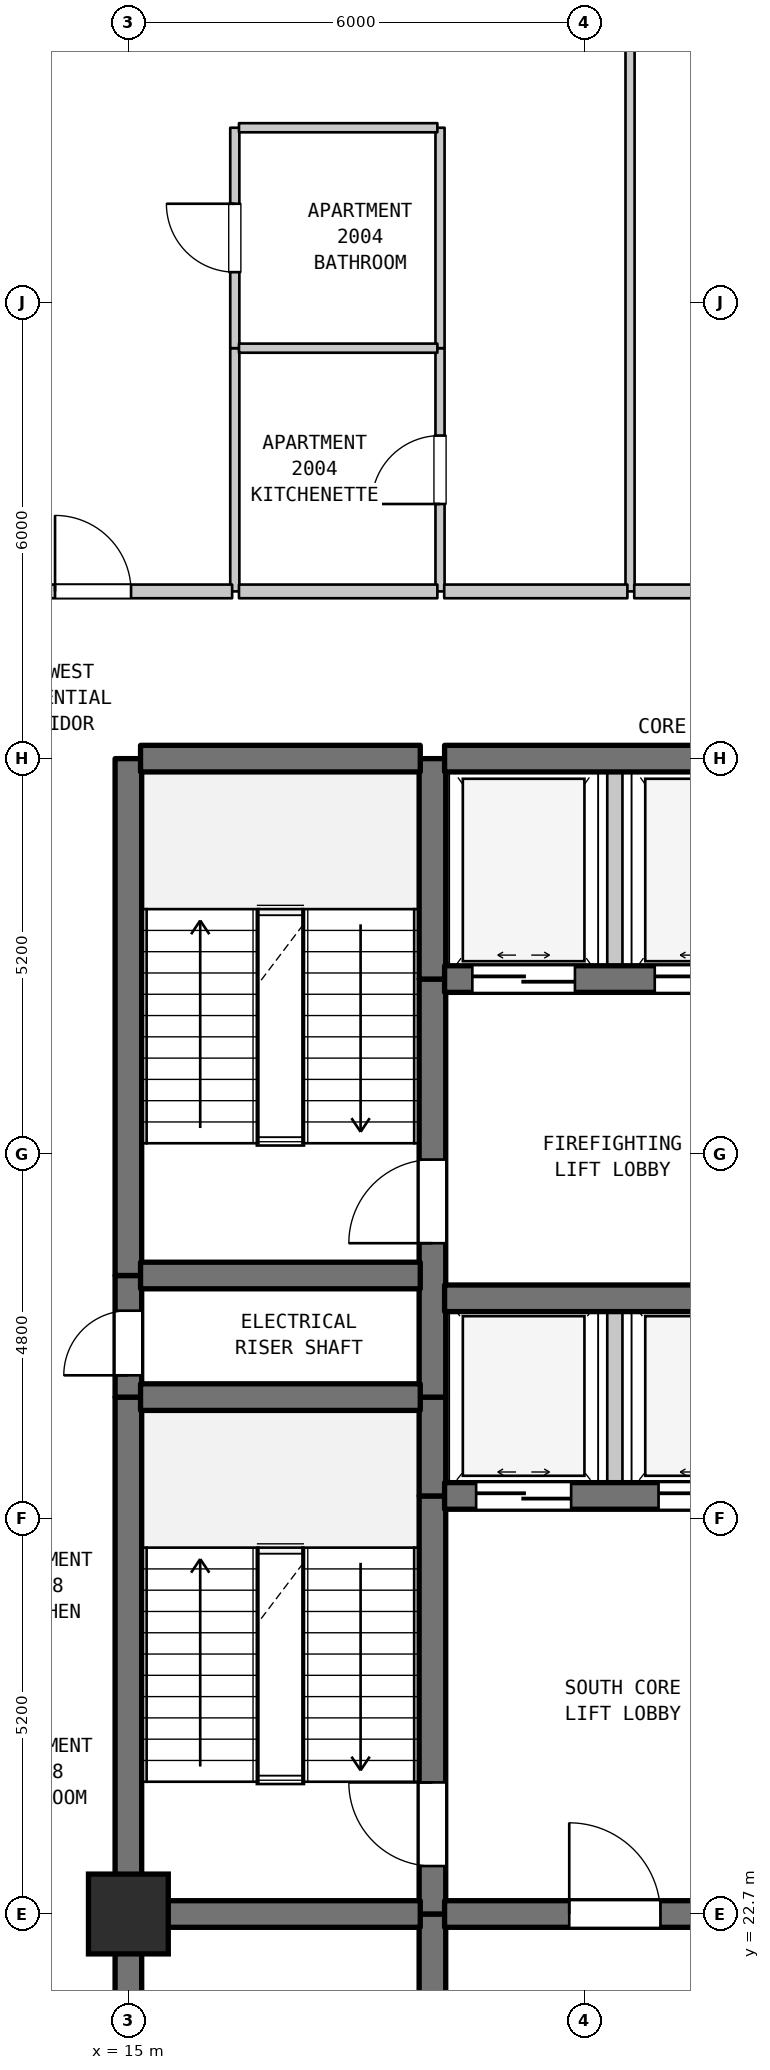
"""IFC4 building model, lengths in metres.
Left out: names, types, materials, properties, quantities, classifications, styles, units other than length and angle.
Written with IfcOpenShell. Run it as: python <this file> out.ifc"""

import sys

from ifc_helpers import new_model, si_unit, direction, frame, frame_2d, origin, origin_2d, place, context, subcontext, project, spatial, rectangle, extrude, element, fill, save


model = new_model("IFC4")
c1 = context("Model", 3, precision=1e-05, world=origin(), true_north=direction((0.0, 1.0)))
c2 = subcontext(c1, "Body", "Model", "MODEL_VIEW")
j1 = project(units=[si_unit("LENGTHUNIT", "METRE"), si_unit("PLANEANGLEUNIT", "RADIAN")], contexts=[c1])
p1 = place(None, origin())
s1 = spatial("IfcSite", under=j1, at=p1, CompositionType="ELEMENT")
p2 = place(p1, origin())
s2 = spatial("IfcBuilding", under=s1, at=p2, CompositionType="ELEMENT")
p3 = place(p2, frame((0.0, 0.0, 86.4)))
s3 = spatial("IfcBuildingStorey", under=s2, at=p3, CompositionType="ELEMENT", Elevation=86.4)
p4 = place(p3, frame((15.0, 22.7, 0.0), z_axis=(0.0, 0.0, 1.0), x_axis=(1.0, 0.0, 0.0)))
e1 = element("IfcColumn", 1, at=p4, inside=s3, PredefinedType="COLUMN", context=c2, shape_type="SweptSolid", body=[
    extrude(rectangle(XDim=1.05, YDim=1.05, at=origin_2d()), origin(), (0.0, 0.0, 1.0), 4.5),
])
p5 = place(p3, frame((15.0, 19.5, 0.0), z_axis=(0.0, 0.0, 1.0), x_axis=(0.0, 1.0, 0.0)))
e2 = element("IfcWall", 2, at=p5, inside=s3, PredefinedType="SHEAR", context=c2, shape_type="SweptSolid", body=[
    extrude(rectangle(XDim=3.2, YDim=0.35, at=frame_2d((1.6, 0.0))), origin(), (0.0, 0.0, 1.0), 4.185),
])
p6 = place(p3, frame((15.0, 22.7, 0.0), z_axis=(0.0, 0.0, 1.0), x_axis=(0.0, 1.0, 0.0)))
e3 = element("IfcWall", 3, at=p6, inside=s3, PredefinedType="SHEAR", context=c2, shape_type="SweptSolid", body=[
    extrude(rectangle(XDim=6.8, YDim=0.35, at=frame_2d((3.4, 0.0))), origin(), (0.0, 0.0, 1.0), 4.185),
])
p7 = place(p3, frame((15.0, 29.5, 0.0), z_axis=(0.0, 0.0, 1.0), x_axis=(0.0, 1.0, 0.0)))
e4 = element("IfcWall", 4, at=p7, inside=s3, PredefinedType="SHEAR", context=c2, shape_type="SweptSolid", body=[
    extrude(rectangle(XDim=1.6, YDim=0.35, at=frame_2d((0.8, 0.0))), origin(), (0.0, 0.0, 1.0), 4.185),
])
p8 = place(p7, frame((0.287, 0.0, 0.0)))
e5 = element("IfcOpeningElement", 5, at=p8, cuts=e4, PredefinedType="OPENING", context=c2, shape_type="SweptSolid", body=[
    extrude(rectangle(XDim=0.85, YDim=2.1, at=frame_2d((0.425, 1.05))), frame((0.0, 0.185, 0.0), z_axis=(0.0, -1.0, 0.0), x_axis=(1.0, 0.0, 0.0)), (0.0, 0.0, 1.0), 0.37),
])
p9 = place(p3, frame((15.0, 31.1, 0.0), z_axis=(0.0, 0.0, 1.0), x_axis=(0.0, 1.0, 0.0)))
e6 = element("IfcWall", 6, at=p9, inside=s3, PredefinedType="SHEAR", context=c2, shape_type="SweptSolid", body=[
    extrude(rectangle(XDim=6.8, YDim=0.35, at=frame_2d((3.4, 0.0))), origin(), (0.0, 0.0, 1.0), 4.185),
])
p10 = place(p3, frame((16.4, 40.1, 0.0), z_axis=(0.0, 0.0, 1.0), x_axis=(0.0, 1.0, 0.0)))
e7 = element("IfcWall", 7, at=p10, inside=s3, PredefinedType="PARTITIONING", context=c2, shape_type="SweptSolid", body=[
    extrude(rectangle(XDim=3.2, YDim=0.12, at=frame_2d((1.6, 0.0))), origin(), (0.0, 0.0, 1.0), 4.185),
])
p11 = place(p3, frame((16.4, 43.3, 0.0), z_axis=(0.0, 0.0, 1.0), x_axis=(0.0, 1.0, 0.0)))
e8 = element("IfcWall", 8, at=p11, inside=s3, PredefinedType="PARTITIONING", context=c2, shape_type="SweptSolid", body=[
    extrude(rectangle(XDim=2.9, YDim=0.12, at=frame_2d((1.45, 0.0))), origin(), (0.0, 0.0, 1.0), 4.185),
])
p12 = place(p11, frame((1.0, 0.0, 0.0)))
e9 = element("IfcOpeningElement", 9, at=p12, cuts=e8, PredefinedType="OPENING", context=c2, shape_type="SweptSolid", body=[
    extrude(rectangle(XDim=0.9, YDim=2.1, at=frame_2d((0.45, 1.05))), frame((0.0, 0.07, 0.0), z_axis=(0.0, -1.0, 0.0), x_axis=(1.0, 0.0, 0.0)), (0.0, 0.0, 1.0), 0.14),
])
p13 = place(p3, frame((19.0, 19.5, 0.0), z_axis=(0.0, 0.0, 1.0), x_axis=(0.0, 1.0, 0.0)))
e10 = element("IfcWall", 10, at=p13, inside=s3, PredefinedType="SHEAR", context=c2, shape_type="SweptSolid", body=[
    extrude(rectangle(XDim=3.2, YDim=0.35, at=frame_2d((1.6, 0.0))), origin(), (0.0, 0.0, 1.0), 4.185),
])
p14 = place(p3, frame((19.0, 22.7, 0.0), z_axis=(0.0, 0.0, 1.0), x_axis=(0.0, 1.0, 0.0)))
e11 = element("IfcWall", 11, at=p14, inside=s3, PredefinedType="SHEAR", context=c2, shape_type="SweptSolid", body=[
    extrude(rectangle(XDim=5.5, YDim=0.35, at=frame_2d((2.75, 0.0))), origin(), (0.0, 0.0, 1.0), 4.185),
])
p15 = place(p14, frame((0.631, 0.0, 0.0)))
e12 = element("IfcOpeningElement", 12, at=p15, cuts=e11, PredefinedType="OPENING", context=c2, shape_type="SweptSolid", body=[
    extrude(rectangle(XDim=1.1, YDim=2.15, at=frame_2d((0.55, 1.075))), frame((0.0, 0.185, 0.0), z_axis=(0.0, -1.0, 0.0), x_axis=(1.0, 0.0, 0.0)), (0.0, 0.0, 1.0), 0.37),
])
p16 = place(p3, frame((19.0, 28.2, 0.0), z_axis=(0.0, 0.0, 1.0), x_axis=(0.0, 1.0, 0.0)))
e13 = element("IfcWall", 13, at=p16, inside=s3, PredefinedType="SHEAR", context=c2, shape_type="SweptSolid", body=[
    extrude(rectangle(XDim=1.3, YDim=0.35, at=frame_2d((0.65, 0.0))), origin(), (0.0, 0.0, 1.0), 4.185),
])
p17 = place(p3, frame((19.0, 29.5, 0.0), z_axis=(0.0, 0.0, 1.0), x_axis=(0.0, 1.0, 0.0)))
e14 = element("IfcWall", 14, at=p17, inside=s3, PredefinedType="SHEAR", context=c2, shape_type="SweptSolid", body=[
    extrude(rectangle(XDim=5.5, YDim=0.35, at=frame_2d((2.75, 0.0))), origin(), (0.0, 0.0, 1.0), 4.185),
])
p18 = place(p17, frame((2.025, 0.0, 0.0)))
e15 = element("IfcOpeningElement", 15, at=p18, cuts=e14, PredefinedType="OPENING", context=c2, shape_type="SweptSolid", body=[
    extrude(rectangle(XDim=1.1, YDim=2.15, at=frame_2d((0.55, 1.075))), frame((0.0, 0.185, 0.0), z_axis=(0.0, -1.0, 0.0), x_axis=(1.0, 0.0, 0.0)), (0.0, 0.0, 1.0), 0.37),
])
p19 = place(p3, frame((19.0, 35.0, 0.0), z_axis=(0.0, 0.0, 1.0), x_axis=(0.0, 1.0, 0.0)))
e16 = element("IfcWall", 16, at=p19, inside=s3, PredefinedType="SHEAR", context=c2, shape_type="SweptSolid", body=[
    extrude(rectangle(XDim=2.9, YDim=0.35, at=frame_2d((1.45, 0.0))), origin(), (0.0, 0.0, 1.0), 4.185),
])
p20 = place(p3, frame((19.1, 40.1, 0.0), z_axis=(0.0, 0.0, 1.0), x_axis=(0.0, 1.0, 0.0)))
e17 = element("IfcWall", 17, at=p20, inside=s3, PredefinedType="PARTITIONING", context=c2, shape_type="SweptSolid", body=[
    extrude(rectangle(XDim=3.2, YDim=0.12, at=frame_2d((1.6, 0.0))), origin(), (0.0, 0.0, 1.0), 4.185),
])
p21 = place(p20, frame((1.15, 0.0, 0.0)))
e18 = element("IfcOpeningElement", 18, at=p21, cuts=e17, PredefinedType="OPENING", context=c2, shape_type="SweptSolid", body=[
    extrude(rectangle(XDim=0.9, YDim=2.15, at=frame_2d((0.45, 1.075))), frame((0.0, 0.07, 0.0), z_axis=(0.0, -1.0, 0.0), x_axis=(1.0, 0.0, 0.0)), (0.0, 0.0, 1.0), 0.14),
])
p22 = place(p3, frame((19.1, 43.3, 0.0), z_axis=(0.0, 0.0, 1.0), x_axis=(0.0, 1.0, 0.0)))
e19 = element("IfcWall", 19, at=p22, inside=s3, PredefinedType="PARTITIONING", context=c2, shape_type="SweptSolid", body=[
    extrude(rectangle(XDim=2.9, YDim=0.12, at=frame_2d((1.45, 0.0))), origin(), (0.0, 0.0, 1.0), 4.185),
])
p23 = place(p3, frame((21.4, 28.2, 0.0), z_axis=(0.0, 0.0, 1.0), x_axis=(0.0, 1.0, 0.0)))
e20 = element("IfcWall", 20, at=p23, inside=s3, PredefinedType="STANDARD", context=c2, shape_type="SweptSolid", body=[
    extrude(rectangle(XDim=2.6, YDim=0.2, at=frame_2d((1.3, 0.0))), origin(), (0.0, 0.0, 1.0), 4.185),
])
p24 = place(p3, frame((21.4, 35.0, 0.0), z_axis=(0.0, 0.0, 1.0), x_axis=(0.0, 1.0, 0.0)))
e21 = element("IfcWall", 21, at=p24, inside=s3, PredefinedType="STANDARD", context=c2, shape_type="SweptSolid", body=[
    extrude(rectangle(XDim=2.9, YDim=0.2, at=frame_2d((1.45, 0.0))), origin(), (0.0, 0.0, 1.0), 4.185),
])
p25 = place(p3, frame((21.6, 40.1, 0.0), z_axis=(0.0, 0.0, 1.0), x_axis=(0.0, 1.0, 0.0)))
e22 = element("IfcWall", 22, at=p25, inside=s3, PredefinedType="PARTITIONING", context=c2, shape_type="SweptSolid", body=[
    extrude(rectangle(XDim=13.79, YDim=0.12, at=frame_2d((6.895, 0.0))), origin(), (0.0, 0.0, 1.0), 4.185),
])
p26 = place(p3, frame((15.16, 22.7, 0.0), z_axis=(0.0, 0.0, 1.0), x_axis=(1.0, 0.0, 0.0)))
e23 = element("IfcWall", 23, at=p26, inside=s3, PredefinedType="SHEAR", context=c2, shape_type="SweptSolid", body=[
    extrude(rectangle(XDim=3.68, YDim=0.35, at=frame_2d((1.84, 0.0))), origin(), (0.0, 0.0, 1.0), 4.185),
])
p27 = place(p3, frame((19.16, 22.7, 0.0), z_axis=(0.0, 0.0, 1.0), x_axis=(1.0, 0.0, 0.0)))
e24 = element("IfcWall", 24, at=p27, inside=s3, PredefinedType="SHEAR", context=c2, shape_type="SweptSolid", body=[
    extrude(rectangle(XDim=4.48, YDim=0.35, at=frame_2d((2.24, 0.0))), origin(), (0.0, 0.0, 1.0), 4.185),
])
p28 = place(p27, frame((1.64, 0.0, 0.0)))
e25 = element("IfcOpeningElement", 25, at=p28, cuts=e24, PredefinedType="OPENING", context=c2, shape_type="SweptSolid", body=[
    extrude(rectangle(XDim=1.2, YDim=2.2, at=frame_2d((0.6, 1.1))), frame((0.0, 0.185, 0.0), z_axis=(0.0, -1.0, 0.0), x_axis=(1.0, 0.0, 0.0)), (0.0, 0.0, 1.0), 0.37),
])
p29 = place(p3, frame((19.16, 28.2, 0.0), z_axis=(0.0, 0.0, 1.0), x_axis=(1.0, 0.0, 0.0)))
e26 = element("IfcWall", 26, at=p29, inside=s3, PredefinedType="SHEAR", context=c2, shape_type="SweptSolid", body=[
    extrude(rectangle(XDim=4.48, YDim=0.35, at=frame_2d((2.24, 0.0))), origin(), (0.0, 0.0, 1.0), 4.185),
])
p30 = place(p29, frame((0.415, 0.0, 0.0)))
e27 = element("IfcOpeningElement", 27, at=p30, cuts=e26, PredefinedType="OPENING", context=c2, shape_type="SweptSolid", body=[
    extrude(rectangle(XDim=1.25, YDim=2.2, at=frame_2d((0.625, 1.1))), frame((0.0, 0.185, 0.0), z_axis=(0.0, -1.0, 0.0), x_axis=(1.0, 0.0, 0.0)), (0.0, 0.0, 1.0), 0.37),
])
p31 = place(p29, frame((2.815, 0.0, 0.0)))
e28 = element("IfcOpeningElement", 28, at=p31, cuts=e26, PredefinedType="OPENING", context=c2, shape_type="SweptSolid", body=[
    extrude(rectangle(XDim=1.25, YDim=2.2, at=frame_2d((0.625, 1.1))), frame((0.0, 0.185, 0.0), z_axis=(0.0, -1.0, 0.0), x_axis=(1.0, 0.0, 0.0)), (0.0, 0.0, 1.0), 0.37),
])
p32 = place(p3, frame((15.16, 29.5, 0.0), z_axis=(0.0, 0.0, 1.0), x_axis=(1.0, 0.0, 0.0)))
e29 = element("IfcWall", 29, at=p32, inside=s3, PredefinedType="SHEAR", context=c2, shape_type="SweptSolid", body=[
    extrude(rectangle(XDim=3.68, YDim=0.35, at=frame_2d((1.84, 0.0))), origin(), (0.0, 0.0, 1.0), 4.185),
])
p33 = place(p3, frame((19.16, 30.8, 0.0), z_axis=(0.0, 0.0, 1.0), x_axis=(1.0, 0.0, 0.0)))
e30 = element("IfcWall", 30, at=p33, inside=s3, PredefinedType="SHEAR", context=c2, shape_type="SweptSolid", body=[
    extrude(rectangle(XDim=4.48, YDim=0.35, at=frame_2d((2.24, 0.0))), origin(), (0.0, 0.0, 1.0), 4.185),
])
p34 = place(p3, frame((15.16, 31.1, 0.0), z_axis=(0.0, 0.0, 1.0), x_axis=(1.0, 0.0, 0.0)))
e31 = element("IfcWall", 31, at=p34, inside=s3, PredefinedType="SHEAR", context=c2, shape_type="SweptSolid", body=[
    extrude(rectangle(XDim=3.68, YDim=0.35, at=frame_2d((1.84, 0.0))), origin(), (0.0, 0.0, 1.0), 4.185),
])
p35 = place(p3, frame((19.16, 35.0, 0.0), z_axis=(0.0, 0.0, 1.0), x_axis=(1.0, 0.0, 0.0)))
e32 = element("IfcWall", 32, at=p35, inside=s3, PredefinedType="SHEAR", context=c2, shape_type="SweptSolid", body=[
    extrude(rectangle(XDim=11.48, YDim=0.35, at=frame_2d((5.74, 0.0))), origin(), (0.0, 0.0, 1.0), 4.185),
])
p36 = place(p35, frame((0.365, 0.0, 0.0)))
e33 = element("IfcOpeningElement", 33, at=p36, cuts=e32, PredefinedType="OPENING", context=c2, shape_type="SweptSolid", body=[
    extrude(rectangle(XDim=1.35, YDim=2.2, at=frame_2d((0.675, 1.1))), frame((0.0, 0.185, 0.0), z_axis=(0.0, -1.0, 0.0), x_axis=(1.0, 0.0, 0.0)), (0.0, 0.0, 1.0), 0.37),
])
p37 = place(p35, frame((2.765, 0.0, 0.0)))
e34 = element("IfcOpeningElement", 34, at=p37, cuts=e32, PredefinedType="OPENING", context=c2, shape_type="SweptSolid", body=[
    extrude(rectangle(XDim=1.35, YDim=2.2, at=frame_2d((0.675, 1.1))), frame((0.0, 0.185, 0.0), z_axis=(0.0, -1.0, 0.0), x_axis=(1.0, 0.0, 0.0)), (0.0, 0.0, 1.0), 0.37),
])
p38 = place(p35, frame((4.915, 0.0, 0.0)))
e35 = element("IfcOpeningElement", 35, at=p38, cuts=e32, PredefinedType="OPENING", context=c2, shape_type="SweptSolid", body=[
    extrude(rectangle(XDim=1.2, YDim=2.2, at=frame_2d((0.6, 1.1))), frame((0.0, 0.185, 0.0), z_axis=(0.0, -1.0, 0.0), x_axis=(1.0, 0.0, 0.0)), (0.0, 0.0, 1.0), 0.37),
])
p39 = place(p35, frame((6.665, 0.0, 0.0)))
e36 = element("IfcOpeningElement", 36, at=p39, cuts=e32, PredefinedType="OPENING", context=c2, shape_type="SweptSolid", body=[
    extrude(rectangle(XDim=1.2, YDim=2.2, at=frame_2d((0.6, 1.1))), frame((0.0, 0.185, 0.0), z_axis=(0.0, -1.0, 0.0), x_axis=(1.0, 0.0, 0.0)), (0.0, 0.0, 1.0), 0.37),
])
p40 = place(p35, frame((8.415, 0.0, 0.0)))
e37 = element("IfcOpeningElement", 37, at=p40, cuts=e32, PredefinedType="OPENING", context=c2, shape_type="SweptSolid", body=[
    extrude(rectangle(XDim=1.2, YDim=2.2, at=frame_2d((0.6, 1.1))), frame((0.0, 0.185, 0.0), z_axis=(0.0, -1.0, 0.0), x_axis=(1.0, 0.0, 0.0)), (0.0, 0.0, 1.0), 0.37),
])
p41 = place(p35, frame((10.16, 0.0, 0.0)))
e38 = element("IfcOpeningElement", 38, at=p41, cuts=e32, PredefinedType="OPENING", context=c2, shape_type="SweptSolid", body=[
    extrude(rectangle(XDim=1.2, YDim=2.2, at=frame_2d((0.6, 1.1))), frame((0.0, 0.185, 0.0), z_axis=(0.0, -1.0, 0.0), x_axis=(1.0, 0.0, 0.0)), (0.0, 0.0, 1.0), 0.37),
])
p42 = place(p3, frame((15.16, 37.9, 0.0), z_axis=(0.0, 0.0, 1.0), x_axis=(1.0, 0.0, 0.0)))
e39 = element("IfcWall", 39, at=p42, inside=s3, PredefinedType="SHEAR", context=c2, shape_type="SweptSolid", body=[
    extrude(rectangle(XDim=3.68, YDim=0.35, at=frame_2d((1.84, 0.0))), origin(), (0.0, 0.0, 1.0), 4.185),
])
p43 = place(p3, frame((19.16, 37.9, 0.0), z_axis=(0.0, 0.0, 1.0), x_axis=(1.0, 0.0, 0.0)))
e40 = element("IfcWall", 40, at=p43, inside=s3, PredefinedType="SHEAR", context=c2, shape_type="SweptSolid", body=[
    extrude(rectangle(XDim=11.48, YDim=0.35, at=frame_2d((5.74, 0.0))), origin(), (0.0, 0.0, 1.0), 4.185),
])
p44 = place(p3, frame((12.875, 40.1, 0.0), z_axis=(0.0, 0.0, 1.0), x_axis=(1.0, 0.0, 0.0)))
e41 = element("IfcWall", 41, at=p44, inside=s3, PredefinedType="STANDARD", context=c2, shape_type="SweptSolid", body=[
    extrude(rectangle(XDim=3.49, YDim=0.18, at=frame_2d((1.745, 0.0))), origin(), (0.0, 0.0, 1.0), 4.185),
])
p45 = place(p44, frame((1.16, 0.0, 0.0)))
e42 = element("IfcOpeningElement", 42, at=p45, cuts=e41, PredefinedType="OPENING", context=c2, shape_type="SweptSolid", body=[
    extrude(rectangle(XDim=1.0, YDim=2.15, at=frame_2d((0.5, 1.075))), frame((0.0, 0.1, 0.0), z_axis=(0.0, -1.0, 0.0), x_axis=(1.0, 0.0, 0.0)), (0.0, 0.0, 1.0), 0.2),
])
p46 = place(p3, frame((16.455, 40.1, 0.0), z_axis=(0.0, 0.0, 1.0), x_axis=(1.0, 0.0, 0.0)))
e43 = element("IfcWall", 43, at=p46, inside=s3, PredefinedType="STANDARD", context=c2, shape_type="SweptSolid", body=[
    extrude(rectangle(XDim=2.61, YDim=0.18, at=frame_2d((1.305, 0.0))), origin(), (0.0, 0.0, 1.0), 4.185),
])
p47 = place(p3, frame((19.155, 40.1, 0.0), z_axis=(0.0, 0.0, 1.0), x_axis=(1.0, 0.0, 0.0)))
e44 = element("IfcWall", 44, at=p47, inside=s3, PredefinedType="STANDARD", context=c2, shape_type="SweptSolid", body=[
    extrude(rectangle(XDim=2.41, YDim=0.18, at=frame_2d((1.205, 0.0))), origin(), (0.0, 0.0, 1.0), 4.185),
])
p48 = place(p3, frame((21.655, 40.1, 0.0), z_axis=(0.0, 0.0, 1.0), x_axis=(1.0, 0.0, 0.0)))
e45 = element("IfcWall", 45, at=p48, inside=s3, PredefinedType="STANDARD", context=c2, shape_type="SweptSolid", body=[
    extrude(rectangle(XDim=4.51, YDim=0.18, at=frame_2d((2.255, 0.0))), origin(), (0.0, 0.0, 1.0), 4.185),
])
p49 = place(p48, frame((1.755, 0.0, 0.0)))
e46 = element("IfcOpeningElement", 46, at=p49, cuts=e45, PredefinedType="OPENING", context=c2, shape_type="SweptSolid", body=[
    extrude(rectangle(XDim=1.0, YDim=2.15, at=frame_2d((0.5, 1.075))), frame((0.0, 0.1, 0.0), z_axis=(0.0, -1.0, 0.0), x_axis=(1.0, 0.0, 0.0)), (0.0, 0.0, 1.0), 0.2),
])
for number, where, z_axis, x_axis in (
    (47, (16.455, 43.3, 0.0), (0.0, 0.0, 1.0), (1.0, 0.0, 0.0)),
    (48, (16.455, 46.2, 0.0), (0.0, 0.0, 1.0), (1.0, 0.0, 0.0)),
):
    element("IfcWall", number, at=place(p3, frame(where, z_axis=z_axis, x_axis=x_axis)), inside=s3, PredefinedType="PARTITIONING", context=c2, shape_type="SweptSolid", body=[
        extrude(rectangle(XDim=2.61, YDim=0.12, at=frame_2d((1.305, 0.0))), origin(), (0.0, 0.0, 1.0), 4.185),
    ])
p50 = place(p8, origin())
e49 = element("IfcDoor", 49, at=p50, inside=s3, OperationType="SINGLE_SWING_LEFT", PredefinedType="DOOR", context=c2, shape_type="SweptSolid", body=[
    extrude(rectangle(XDim=0.85, YDim=2.1, at=frame_2d((0.425, 1.05))), frame((0.0, 0.025, 0.0), z_axis=(0.0, -1.0, 0.0), x_axis=(1.0, 0.0, 0.0)), (0.0, 0.0, 1.0), 0.05),
])
fill(e5, e49)
p51 = place(p12, origin())
e50 = element("IfcDoor", 50, at=p51, inside=s3, OperationType="SINGLE_SWING_RIGHT", PredefinedType="DOOR", context=c2, shape_type="SweptSolid", body=[
    extrude(rectangle(XDim=0.9, YDim=2.1, at=frame_2d((0.45, 1.05))), frame((0.0, 0.025, 0.0), z_axis=(0.0, -1.0, 0.0), x_axis=(1.0, 0.0, 0.0)), (0.0, 0.0, 1.0), 0.05),
])
fill(e9, e50)
p52 = place(p15, origin())
e51 = element("IfcDoor", 51, at=p52, inside=s3, OperationType="SINGLE_SWING_RIGHT", PredefinedType="DOOR", context=c2, shape_type="SweptSolid", body=[
    extrude(rectangle(XDim=1.1, YDim=2.15, at=frame_2d((0.55, 1.075))), frame((0.0, 0.025, 0.0), z_axis=(0.0, -1.0, 0.0), x_axis=(1.0, 0.0, 0.0)), (0.0, 0.0, 1.0), 0.05),
])
fill(e12, e51)
p53 = place(p18, origin())
e52 = element("IfcDoor", 52, at=p53, inside=s3, OperationType="SINGLE_SWING_LEFT", PredefinedType="DOOR", context=c2, shape_type="SweptSolid", body=[
    extrude(rectangle(XDim=1.1, YDim=2.15, at=frame_2d((0.55, 1.075))), frame((0.0, 0.025, 0.0), z_axis=(0.0, -1.0, 0.0), x_axis=(1.0, 0.0, 0.0)), (0.0, 0.0, 1.0), 0.05),
])
fill(e15, e52)
p54 = place(p21, origin())
e53 = element("IfcDoor", 53, at=p54, inside=s3, OperationType="SINGLE_SWING_LEFT", PredefinedType="DOOR", context=c2, shape_type="SweptSolid", body=[
    extrude(rectangle(XDim=0.9, YDim=2.15, at=frame_2d((0.45, 1.075))), frame((0.0, 0.025, 0.0), z_axis=(0.0, -1.0, 0.0), x_axis=(1.0, 0.0, 0.0)), (0.0, 0.0, 1.0), 0.05),
])
fill(e18, e53)
p55 = place(p28, origin())
e54 = element("IfcDoor", 54, at=p55, inside=s3, OperationType="SINGLE_SWING_LEFT", PredefinedType="DOOR", context=c2, shape_type="SweptSolid", body=[
    extrude(rectangle(XDim=1.2, YDim=2.2, at=frame_2d((0.6, 1.1))), frame((0.0, 0.025, 0.0), z_axis=(0.0, -1.0, 0.0), x_axis=(1.0, 0.0, 0.0)), (0.0, 0.0, 1.0), 0.05),
])
fill(e25, e54)
p56 = place(p30, origin())
e55 = element("IfcDoor", 55, at=p56, inside=s3, OperationType="DOUBLE_DOOR_SLIDING", PredefinedType="DOOR", context=c2, shape_type="SweptSolid", body=[
    extrude(rectangle(XDim=1.25, YDim=2.2, at=frame_2d((0.625, 1.1))), frame((0.0, 0.025, 0.0), z_axis=(0.0, -1.0, 0.0), x_axis=(1.0, 0.0, 0.0)), (0.0, 0.0, 1.0), 0.05),
])
fill(e27, e55)
p57 = place(p31, origin())
e56 = element("IfcDoor", 56, at=p57, inside=s3, OperationType="DOUBLE_DOOR_SLIDING", PredefinedType="DOOR", context=c2, shape_type="SweptSolid", body=[
    extrude(rectangle(XDim=1.25, YDim=2.2, at=frame_2d((0.625, 1.1))), frame((0.0, 0.025, 0.0), z_axis=(0.0, -1.0, 0.0), x_axis=(1.0, 0.0, 0.0)), (0.0, 0.0, 1.0), 0.05),
])
fill(e28, e56)
p58 = place(p36, origin())
e57 = element("IfcDoor", 57, at=p58, inside=s3, OperationType="DOUBLE_DOOR_SLIDING", PredefinedType="DOOR", context=c2, shape_type="SweptSolid", body=[
    extrude(rectangle(XDim=1.35, YDim=2.2, at=frame_2d((0.675, 1.1))), frame((0.0, 0.025, 0.0), z_axis=(0.0, -1.0, 0.0), x_axis=(1.0, 0.0, 0.0)), (0.0, 0.0, 1.0), 0.05),
])
fill(e33, e57)
p59 = place(p37, origin())
e58 = element("IfcDoor", 58, at=p59, inside=s3, OperationType="DOUBLE_DOOR_SLIDING", PredefinedType="DOOR", context=c2, shape_type="SweptSolid", body=[
    extrude(rectangle(XDim=1.35, YDim=2.2, at=frame_2d((0.675, 1.1))), frame((0.0, 0.025, 0.0), z_axis=(0.0, -1.0, 0.0), x_axis=(1.0, 0.0, 0.0)), (0.0, 0.0, 1.0), 0.05),
])
fill(e34, e58)
p60 = place(p45, origin())
e59 = element("IfcDoor", 59, at=p60, inside=s3, OperationType="SINGLE_SWING_LEFT", PredefinedType="DOOR", context=c2, shape_type="SweptSolid", body=[
    extrude(rectangle(XDim=1.0, YDim=2.15, at=frame_2d((0.5, 1.075))), frame((0.0, 0.025, 0.0), z_axis=(0.0, -1.0, 0.0), x_axis=(1.0, 0.0, 0.0)), (0.0, 0.0, 1.0), 0.05),
])
fill(e42, e59)
save(model, sys.argv[1])
